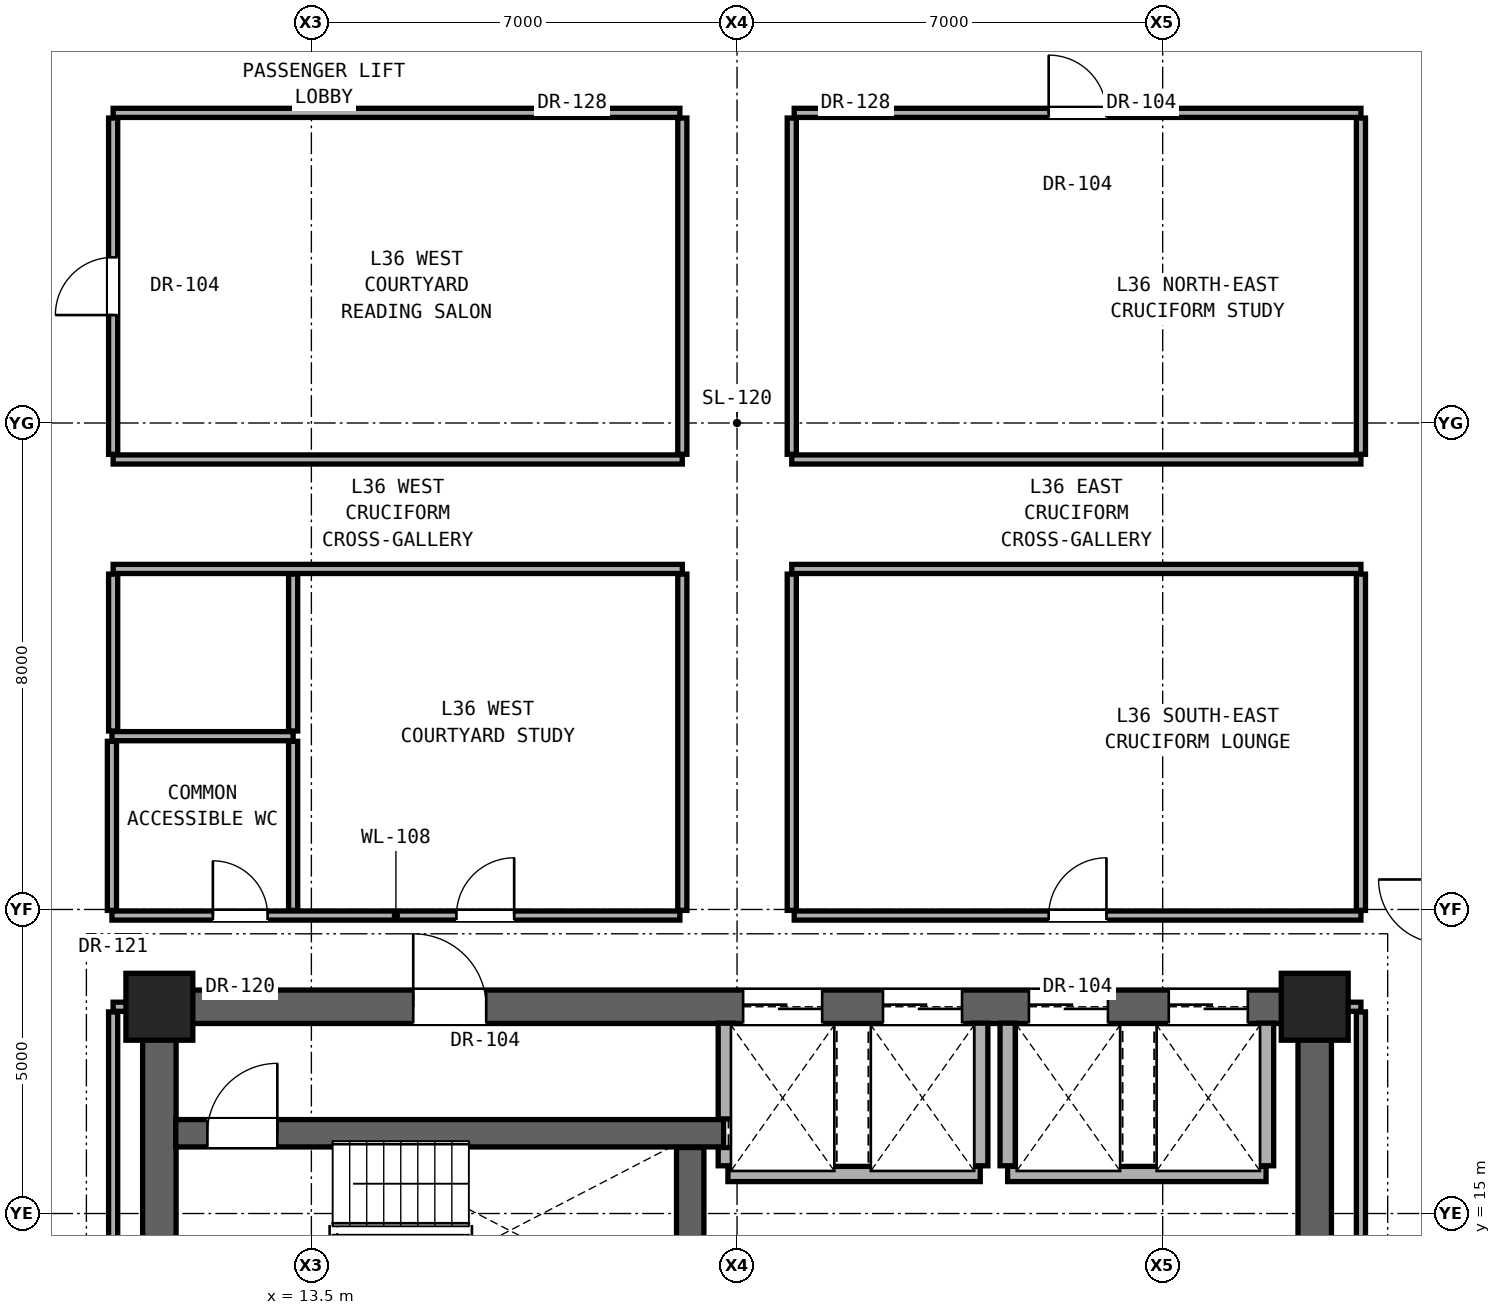
"""IFC4 building model, lengths in metres.
Left out: names, types, materials, properties, quantities, classifications, styles, units other than length and angle.
Written with IfcOpenShell. Run it as: python <this file> out.ifc"""

import sys

from ifc_helpers import new_model, si_unit, direction, frame, frame_2d, origin, origin_2d, place, context, subcontext, project, spatial, rectangle, extrude, element, fill, save


model = new_model("IFC4")
c1 = context("Model", 3, precision=1e-05, world=origin(), true_north=direction((0.0, 1.0)))
c2 = subcontext(c1, "Body", "Model", "MODEL_VIEW")
j1 = project(units=[si_unit("LENGTHUNIT", "METRE"), si_unit("PLANEANGLEUNIT", "RADIAN")], contexts=[c1])
p1 = place(None, origin())
s1 = spatial("IfcSite", under=j1, at=p1, CompositionType="ELEMENT")
p2 = place(p1, origin())
s2 = spatial("IfcBuilding", under=s1, at=p2, CompositionType="ELEMENT")
p3 = place(p2, frame((0.0, 0.0, 128.0)))
s3 = spatial("IfcBuildingStorey", under=s2, at=p3, CompositionType="ELEMENT", Elevation=128.0)
for number, where, z_axis, x_axis in (
    (1, (11.0, 18.4, 0.0), (0.0, 0.0, 1.0), (1.0, 0.0, 0.0)),
    (2, (30.0, 18.4, 0.0), (0.0, 0.0, 1.0), (1.0, 0.0, 0.0)),
):
    element("IfcColumn", number, at=place(p3, frame(where, z_axis=z_axis, x_axis=x_axis)), inside=s3, PredefinedType="COLUMN", context=c2, shape_type="SweptSolid", body=[
        extrude(rectangle(XDim=1.1, YDim=1.1, at=origin_2d()), origin(), (0.0, 0.0, 1.0), 3.3),
    ])
for number, where, z_axis, x_axis in (
    (3, (11.0, 12.4, 0.0), (0.0, 0.0, 1.0), (0.0, 1.0, 0.0)),
    (4, (30.0, 12.4, 0.0), (0.0, 0.0, 1.0), (0.0, 1.0, 0.0)),
):
    element("IfcWall", number, at=place(p3, frame(where, z_axis=z_axis, x_axis=x_axis)), inside=s3, PredefinedType="SHEAR", context=c2, shape_type="SweptSolid", body=[
        extrude(rectangle(XDim=6.0, YDim=0.55, at=frame_2d((3.0, 0.0))), origin(), (0.0, 0.0, 1.0), 3.08),
    ])
p4 = place(p3, frame((11.0, 18.4, 0.0), z_axis=(0.0, 0.0, 1.0), x_axis=(1.0, 0.0, 0.0)))
e5 = element("IfcWall", 5, at=p4, inside=s3, PredefinedType="SHEAR", context=c2, shape_type="SweptSolid", body=[
    extrude(rectangle(XDim=19.0, YDim=0.55, at=frame_2d((9.5, 0.0))), origin(), (0.0, 0.0, 1.0), 3.08),
])
p5 = place(p4, frame((4.175, 0.0, 0.0)))
e6 = element("IfcOpeningElement", 6, at=p5, cuts=e5, PredefinedType="OPENING", context=c2, shape_type="SweptSolid", body=[
    extrude(rectangle(XDim=1.2, YDim=2.25, at=frame_2d((0.6, 1.125))), frame((0.0, 0.285, 0.0), z_axis=(0.0, -1.0, 0.0), x_axis=(1.0, 0.0, 0.0)), (0.0, 0.0, 1.0), 0.57),
])
p6 = place(p4, frame((9.6, 0.0, 0.0)))
e7 = element("IfcOpeningElement", 7, at=p6, cuts=e5, PredefinedType="OPENING", context=c2, shape_type="SweptSolid", body=[
    extrude(rectangle(XDim=1.3, YDim=2.3, at=frame_2d((0.65, 1.15))), frame((0.0, 0.285, 0.0), z_axis=(0.0, -1.0, 0.0), x_axis=(1.0, 0.0, 0.0)), (0.0, 0.0, 1.0), 0.57),
])
p7 = place(p4, frame((11.9, 0.0, 0.0)))
e8 = element("IfcOpeningElement", 8, at=p7, cuts=e5, PredefinedType="OPENING", context=c2, shape_type="SweptSolid", body=[
    extrude(rectangle(XDim=1.3, YDim=2.3, at=frame_2d((0.65, 1.15))), frame((0.0, 0.285, 0.0), z_axis=(0.0, -1.0, 0.0), x_axis=(1.0, 0.0, 0.0)), (0.0, 0.0, 1.0), 0.57),
])
p8 = place(p4, frame((14.3, 0.0, 0.0)))
e9 = element("IfcOpeningElement", 9, at=p8, cuts=e5, PredefinedType="OPENING", context=c2, shape_type="SweptSolid", body=[
    extrude(rectangle(XDim=1.3, YDim=2.3, at=frame_2d((0.65, 1.15))), frame((0.0, 0.285, 0.0), z_axis=(0.0, -1.0, 0.0), x_axis=(1.0, 0.0, 0.0)), (0.0, 0.0, 1.0), 0.57),
])
p9 = place(p4, frame((16.6, 0.0, 0.0)))
e10 = element("IfcOpeningElement", 10, at=p9, cuts=e5, PredefinedType="OPENING", context=c2, shape_type="SweptSolid", body=[
    extrude(rectangle(XDim=1.3, YDim=2.3, at=frame_2d((0.65, 1.15))), frame((0.0, 0.285, 0.0), z_axis=(0.0, -1.0, 0.0), x_axis=(1.0, 0.0, 0.0)), (0.0, 0.0, 1.0), 0.57),
])
p10 = place(p3, frame((20.35, 15.65, 0.0), z_axis=(0.0, 0.0, 1.0), x_axis=(1.0, 0.0, 0.0)))
e11 = element("IfcWall", 11, at=p10, inside=s3, PredefinedType="SOLIDWALL", context=c2, shape_type="SweptSolid", body=[
    extrude(rectangle(XDim=4.15, YDim=0.25, at=frame_2d((2.075, 0.0))), origin(), (0.0, 0.0, 1.0), 3.08),
])
p11 = place(p3, frame((24.95, 15.65, 0.0), z_axis=(0.0, 0.0, 1.0), x_axis=(1.0, 0.0, 0.0)))
e12 = element("IfcWall", 12, at=p11, inside=s3, PredefinedType="SOLIDWALL", context=c2, shape_type="SweptSolid", body=[
    extrude(rectangle(XDim=4.25, YDim=0.25, at=frame_2d((2.125, 0.0))), origin(), (0.0, 0.0, 1.0), 3.08),
])
p12 = place(p3, frame((11.27, 16.32, 0.0), z_axis=(0.0, 0.0, 1.0), x_axis=(1.0, 0.0, 0.0)))
e13 = element("IfcWall", 13, at=p12, inside=s3, PredefinedType="SHEAR", context=c2, shape_type="SweptSolid", body=[
    extrude(rectangle(XDim=9.01, YDim=0.45, at=frame_2d((4.505, 0.0))), origin(), (0.0, 0.0, 1.0), 3.08),
])
p13 = place(p12, frame((0.52, 0.0, 0.0)))
e14 = element("IfcOpeningElement", 14, at=p13, cuts=e13, PredefinedType="OPENING", context=c2, shape_type="SweptSolid", body=[
    extrude(rectangle(XDim=1.15, YDim=2.2, at=frame_2d((0.575, 1.1))), frame((0.0, 0.235, 0.0), z_axis=(0.0, -1.0, 0.0), x_axis=(1.0, 0.0, 0.0)), (0.0, 0.0, 1.0), 0.47),
])
for number, where, z_axis, x_axis in (
    (15, (10.24, 18.4, 0.0), (0.0, 0.0, 1.0), (1.0, 0.0, 0.0)),
    (16, (30.27, 18.4, 0.0), (0.0, 0.0, 1.0), (1.0, 0.0, 0.0)),
):
    element("IfcWall", number, at=place(p3, frame(where, z_axis=z_axis, x_axis=x_axis)), inside=s3, PredefinedType="PARTITIONING", context=c2, shape_type="SweptSolid", body=[
        extrude(rectangle(XDim=0.49, YDim=0.15, at=frame_2d((0.245, 0.0))), origin(), (0.0, 0.0, 1.0), 2.456),
    ])
p14 = place(p3, frame((10.22, 19.9, 0.0), z_axis=(0.0, 0.0, 1.0), x_axis=(1.0, 0.0, 0.0)))
e17 = element("IfcWall", 17, at=p14, inside=s3, PredefinedType="PARTITIONING", context=c2, shape_type="SweptSolid", body=[
    extrude(rectangle(XDim=9.34, YDim=0.15, at=frame_2d((4.67, 0.0))), origin(), (0.0, 0.0, 1.0), 2.216),
])
p15 = place(p14, frame((1.66, 0.0, 0.0)))
e18 = element("IfcOpeningElement", 18, at=p15, cuts=e17, PredefinedType="OPENING", context=c2, shape_type="SweptSolid", body=[
    extrude(rectangle(XDim=0.9, YDim=2.1, at=frame_2d((0.45, 1.05))), frame((0.0, 0.085, 0.0), z_axis=(0.0, -1.0, 0.0), x_axis=(1.0, 0.0, 0.0)), (0.0, 0.0, 1.0), 0.17),
])
p16 = place(p14, frame((5.665, 0.0, 0.0)))
e19 = element("IfcOpeningElement", 19, at=p16, cuts=e17, PredefinedType="OPENING", context=c2, shape_type="SweptSolid", body=[
    extrude(rectangle(XDim=0.95, YDim=2.15, at=frame_2d((0.475, 1.075))), frame((0.0, 0.085, 0.0), z_axis=(0.0, -1.0, 0.0), x_axis=(1.0, 0.0, 0.0)), (0.0, 0.0, 1.0), 0.17),
])
p17 = place(p3, frame((21.44, 19.9, 0.0), z_axis=(0.0, 0.0, 1.0), x_axis=(1.0, 0.0, 0.0)))
e20 = element("IfcWall", 20, at=p17, inside=s3, PredefinedType="PARTITIONING", context=c2, shape_type="SweptSolid", body=[
    extrude(rectangle(XDim=9.32, YDim=0.15, at=frame_2d((4.66, 0.0))), origin(), (0.0, 0.0, 1.0), 2.216),
])
p18 = place(p17, frame((4.185, 0.0, 0.0)))
e21 = element("IfcOpeningElement", 21, at=p18, cuts=e20, PredefinedType="OPENING", context=c2, shape_type="SweptSolid", body=[
    extrude(rectangle(XDim=0.95, YDim=2.15, at=frame_2d((0.475, 1.075))), frame((0.0, 0.085, 0.0), z_axis=(0.0, -1.0, 0.0), x_axis=(1.0, 0.0, 0.0)), (0.0, 0.0, 1.0), 0.17),
])
p19 = place(p3, frame((10.22, 22.85, 0.0), z_axis=(0.0, 0.0, 1.0), x_axis=(1.0, 0.0, 0.0)))
e22 = element("IfcWall", 22, at=p19, inside=s3, PredefinedType="PARTITIONING", context=c2, shape_type="SweptSolid", body=[
    extrude(rectangle(XDim=2.98, YDim=0.15, at=frame_2d((1.49, 0.0))), origin(), (0.0, 0.0, 1.0), 2.216),
])
for number, where, z_axis, x_axis in (
    (23, (10.24, 25.6, 0.0), (0.0, 0.0, 1.0), (1.0, 0.0, 0.0)),
    (24, (21.4, 25.6, 0.0), (0.0, 0.0, 1.0), (1.0, 0.0, 0.0)),
    (25, (10.24, 27.4, 0.0), (0.0, 0.0, 1.0), (1.0, 0.0, 0.0)),
    (26, (21.4, 27.4, 0.0), (0.0, 0.0, 1.0), (1.0, 0.0, 0.0)),
):
    element("IfcWall", number, at=place(p3, frame(where, z_axis=z_axis, x_axis=x_axis)), inside=s3, PredefinedType="PARTITIONING", context=c2, shape_type="SweptSolid", body=[
        extrude(rectangle(XDim=9.36, YDim=0.15, at=frame_2d((4.68, 0.0))), origin(), (0.0, 0.0, 1.0), 2.216),
    ])
p20 = place(p3, frame((10.24, 33.1, 0.0), z_axis=(0.0, 0.0, 1.0), x_axis=(1.0, 0.0, 0.0)))
e27 = element("IfcWall", 27, at=p20, inside=s3, PredefinedType="PARTITIONING", context=c2, shape_type="SweptSolid", body=[
    extrude(rectangle(XDim=9.32, YDim=0.15, at=frame_2d((4.66, 0.0))), origin(), (0.0, 0.0, 1.0), 2.216),
])
p21 = place(p3, frame((21.44, 33.1, 0.0), z_axis=(0.0, 0.0, 1.0), x_axis=(1.0, 0.0, 0.0)))
e28 = element("IfcWall", 28, at=p21, inside=s3, PredefinedType="PARTITIONING", context=c2, shape_type="SweptSolid", body=[
    extrude(rectangle(XDim=9.32, YDim=0.15, at=frame_2d((4.66, 0.0))), origin(), (0.0, 0.0, 1.0), 2.216),
])
p22 = place(p21, frame((4.185, 0.0, 0.0)))
e29 = element("IfcOpeningElement", 29, at=p22, cuts=e28, PredefinedType="OPENING", context=c2, shape_type="SweptSolid", body=[
    extrude(rectangle(XDim=0.95, YDim=2.15, at=frame_2d((0.475, 1.075))), frame((0.0, 0.085, 0.0), z_axis=(0.0, -1.0, 0.0), x_axis=(1.0, 0.0, 0.0)), (0.0, 0.0, 1.0), 0.17),
])
p23 = place(p3, frame((10.22, 19.985, 0.0), z_axis=(0.0, 0.0, 1.0), x_axis=(0.0, 1.0, 0.0)))
e30 = element("IfcWall", 30, at=p23, inside=s3, PredefinedType="PARTITIONING", context=c2, shape_type="SweptSolid", body=[
    extrude(rectangle(XDim=2.78, YDim=0.15, at=frame_2d((1.39, 0.0))), origin(), (0.0, 0.0, 1.0), 3.08),
])
p24 = place(p3, frame((10.24, 12.335, 0.0), z_axis=(0.0, 0.0, 1.0), x_axis=(0.0, 1.0, 0.0)))
e31 = element("IfcWall", 31, at=p24, inside=s3, PredefinedType="PARTITIONING", context=c2, shape_type="SweptSolid", body=[
    extrude(rectangle(XDim=5.98, YDim=0.15, at=frame_2d((2.99, 0.0))), origin(), (0.0, 0.0, 1.0), 2.456),
])
p25 = place(p3, frame((10.24, 22.935, 0.0), z_axis=(0.0, 0.0, 1.0), x_axis=(0.0, 1.0, 0.0)))
e32 = element("IfcWall", 32, at=p25, inside=s3, PredefinedType="PARTITIONING", context=c2, shape_type="SweptSolid", body=[
    extrude(rectangle(XDim=2.58, YDim=0.15, at=frame_2d((1.29, 0.0))), origin(), (0.0, 0.0, 1.0), 2.299),
])
p26 = place(p3, frame((10.24, 27.485, 0.0), z_axis=(0.0, 0.0, 1.0), x_axis=(0.0, 1.0, 0.0)))
e33 = element("IfcWall", 33, at=p26, inside=s3, PredefinedType="PARTITIONING", context=c2, shape_type="SweptSolid", body=[
    extrude(rectangle(XDim=5.53, YDim=0.15, at=frame_2d((2.765, 0.0))), origin(), (0.0, 0.0, 1.0), 2.299),
])
p27 = place(p26, frame((2.29, 0.0, 0.0)))
e34 = element("IfcOpeningElement", 34, at=p27, cuts=e33, PredefinedType="OPENING", context=c2, shape_type="SweptSolid", body=[
    extrude(rectangle(XDim=0.95, YDim=2.15, at=frame_2d((0.475, 1.075))), frame((0.0, 0.085, 0.0), z_axis=(0.0, -1.0, 0.0), x_axis=(1.0, 0.0, 0.0)), (0.0, 0.0, 1.0), 0.17),
])
p28 = place(p3, frame((13.2, 19.985, 0.0), z_axis=(0.0, 0.0, 1.0), x_axis=(0.0, 1.0, 0.0)))
e35 = element("IfcWall", 35, at=p28, inside=s3, PredefinedType="PARTITIONING", context=c2, shape_type="SweptSolid", body=[
    extrude(rectangle(XDim=2.78, YDim=0.15, at=frame_2d((1.39, 0.0))), origin(), (0.0, 0.0, 1.0), 3.08),
])
p29 = place(p3, frame((13.2, 22.935, 0.0), z_axis=(0.0, 0.0, 1.0), x_axis=(0.0, 1.0, 0.0)))
e36 = element("IfcWall", 36, at=p29, inside=s3, PredefinedType="PARTITIONING", context=c2, shape_type="SweptSolid", body=[
    extrude(rectangle(XDim=2.58, YDim=0.15, at=frame_2d((1.29, 0.0))), origin(), (0.0, 0.0, 1.0), 2.216),
])
for number, where, z_axis, x_axis in (
    (37, (19.6, 19.985, 0.0), (0.0, 0.0, 1.0), (0.0, 1.0, 0.0)),
    (38, (19.6, 27.485, 0.0), (0.0, 0.0, 1.0), (0.0, 1.0, 0.0)),
):
    element("IfcWall", number, at=place(p3, frame(where, z_axis=z_axis, x_axis=x_axis)), inside=s3, PredefinedType="PARTITIONING", context=c2, shape_type="SweptSolid", body=[
        extrude(rectangle(XDim=5.53, YDim=0.15, at=frame_2d((2.765, 0.0))), origin(), (0.0, 0.0, 1.0), 2.216),
    ])
p30 = place(p3, frame((19.73, 13.355, 0.0), z_axis=(0.0, 0.0, 1.0), x_axis=(0.0, 1.0, 0.0)))
e39 = element("IfcWall", 39, at=p30, inside=s3, PredefinedType="SHEAR", context=c2, shape_type="SweptSolid", body=[
    extrude(rectangle(XDim=2.73, YDim=0.45, at=frame_2d((1.365, 0.0))), origin(), (0.0, 0.0, 1.0), 3.08),
])
p31 = place(p3, frame((20.315, 15.785, 0.0), z_axis=(0.0, 0.0, 1.0), x_axis=(0.0, 1.0, 0.0)))
e40 = element("IfcWall", 40, at=p31, inside=s3, PredefinedType="SOLIDWALL", context=c2, shape_type="SweptSolid", body=[
    extrude(rectangle(XDim=0.3, YDim=0.25, at=frame_2d((0.15, 0.0))), origin(), (0.0, 0.0, 1.0), 3.08),
])
p32 = place(p3, frame((20.315, 16.555, 0.0), z_axis=(0.0, 0.0, 1.0), x_axis=(0.0, 1.0, 0.0)))
e41 = element("IfcWall", 41, at=p32, inside=s3, PredefinedType="SOLIDWALL", context=c2, shape_type="SweptSolid", body=[
    extrude(rectangle(XDim=1.575, YDim=0.25, at=frame_2d((0.788, 0.0))), origin(), (0.0, 0.0, 1.0), 3.08),
])
for number, where, z_axis, x_axis in (
    (42, (21.4, 19.985, 0.0), (0.0, 0.0, 1.0), (0.0, 1.0, 0.0)),
    (43, (21.4, 27.485, 0.0), (0.0, 0.0, 1.0), (0.0, 1.0, 0.0)),
):
    element("IfcWall", number, at=place(p3, frame(where, z_axis=z_axis, x_axis=x_axis)), inside=s3, PredefinedType="PARTITIONING", context=c2, shape_type="SweptSolid", body=[
        extrude(rectangle(XDim=5.53, YDim=0.15, at=frame_2d((2.765, 0.0))), origin(), (0.0, 0.0, 1.0), 2.216),
    ])
for number, where, z_axis, x_axis in (
    (44, (24.5, 15.785, 0.0), (0.0, 0.0, 1.0), (0.0, 1.0, 0.0)),
    (45, (24.95, 15.785, 0.0), (0.0, 0.0, 1.0), (0.0, 1.0, 0.0)),
    (46, (29.2, 15.785, 0.0), (0.0, 0.0, 1.0), (0.0, 1.0, 0.0)),
):
    element("IfcWall", number, at=place(p3, frame(where, z_axis=z_axis, x_axis=x_axis)), inside=s3, PredefinedType="SOLIDWALL", context=c2, shape_type="SweptSolid", body=[
        extrude(rectangle(XDim=2.345, YDim=0.25, at=frame_2d((1.172, 0.0))), origin(), (0.0, 0.0, 1.0), 3.08),
    ])
p33 = place(p3, frame((30.76, 12.335, 0.0), z_axis=(0.0, 0.0, 1.0), x_axis=(0.0, 1.0, 0.0)))
e47 = element("IfcWall", 47, at=p33, inside=s3, PredefinedType="PARTITIONING", context=c2, shape_type="SweptSolid", body=[
    extrude(rectangle(XDim=5.98, YDim=0.15, at=frame_2d((2.99, 0.0))), origin(), (0.0, 0.0, 1.0), 2.456),
])
for number, where, z_axis, x_axis in (
    (48, (30.76, 19.985, 0.0), (0.0, 0.0, 1.0), (0.0, 1.0, 0.0)),
    (49, (30.76, 27.485, 0.0), (0.0, 0.0, 1.0), (0.0, 1.0, 0.0)),
):
    element("IfcWall", number, at=place(p3, frame(where, z_axis=z_axis, x_axis=x_axis)), inside=s3, PredefinedType="PARTITIONING", context=c2, shape_type="SweptSolid", body=[
        extrude(rectangle(XDim=5.53, YDim=0.15, at=frame_2d((2.765, 0.0))), origin(), (0.0, 0.0, 1.0), 2.299),
    ])
p34 = place(p5, origin())
e50 = element("IfcDoor", 50, at=p34, inside=s3, OperationType="SINGLE_SWING_LEFT", PredefinedType="DOOR", context=c2, shape_type="SweptSolid", body=[
    extrude(rectangle(XDim=1.2, YDim=2.25, at=frame_2d((0.6, 1.125))), frame((0.0, 0.025, 0.0), z_axis=(0.0, -1.0, 0.0), x_axis=(1.0, 0.0, 0.0)), (0.0, 0.0, 1.0), 0.05),
])
fill(e6, e50)
p35 = place(p13, origin())
e51 = element("IfcDoor", 51, at=p35, inside=s3, OperationType="SINGLE_SWING_RIGHT", PredefinedType="DOOR", context=c2, shape_type="SweptSolid", body=[
    extrude(rectangle(XDim=1.15, YDim=2.2, at=frame_2d((0.575, 1.1))), frame((0.0, 0.025, 0.0), z_axis=(0.0, -1.0, 0.0), x_axis=(1.0, 0.0, 0.0)), (0.0, 0.0, 1.0), 0.05),
])
fill(e14, e51)
p36 = place(p15, origin())
e52 = element("IfcDoor", 52, at=p36, inside=s3, OperationType="SINGLE_SWING_LEFT", PredefinedType="DOOR", context=c2, shape_type="SweptSolid", body=[
    extrude(rectangle(XDim=0.9, YDim=2.1, at=frame_2d((0.45, 1.05))), frame((0.0, 0.025, 0.0), z_axis=(0.0, -1.0, 0.0), x_axis=(1.0, 0.0, 0.0)), (0.0, 0.0, 1.0), 0.05),
])
fill(e18, e52)
p37 = place(p16, origin())
e53 = element("IfcDoor", 53, at=p37, inside=s3, OperationType="SINGLE_SWING_RIGHT", PredefinedType="DOOR", context=c2, shape_type="SweptSolid", body=[
    extrude(rectangle(XDim=0.95, YDim=2.15, at=frame_2d((0.475, 1.075))), frame((0.0, 0.025, 0.0), z_axis=(0.0, -1.0, 0.0), x_axis=(1.0, 0.0, 0.0)), (0.0, 0.0, 1.0), 0.05),
])
fill(e19, e53)
p38 = place(p27, origin())
e54 = element("IfcDoor", 54, at=p38, inside=s3, OperationType="SINGLE_SWING_LEFT", PredefinedType="DOOR", context=c2, shape_type="SweptSolid", body=[
    extrude(rectangle(XDim=0.95, YDim=2.15, at=frame_2d((0.475, 1.075))), frame((0.0, 0.025, 0.0), z_axis=(0.0, -1.0, 0.0), x_axis=(1.0, 0.0, 0.0)), (0.0, 0.0, 1.0), 0.05),
])
fill(e34, e54)
p39 = place(p18, origin())
e55 = element("IfcDoor", 55, at=p39, inside=s3, OperationType="SINGLE_SWING_RIGHT", PredefinedType="DOOR", context=c2, shape_type="SweptSolid", body=[
    extrude(rectangle(XDim=0.95, YDim=2.15, at=frame_2d((0.475, 1.075))), frame((0.0, 0.025, 0.0), z_axis=(0.0, -1.0, 0.0), x_axis=(1.0, 0.0, 0.0)), (0.0, 0.0, 1.0), 0.05),
])
fill(e21, e55)
p40 = place(p22, origin())
e56 = element("IfcDoor", 56, at=p40, inside=s3, OperationType="SINGLE_SWING_LEFT", PredefinedType="DOOR", context=c2, shape_type="SweptSolid", body=[
    extrude(rectangle(XDim=0.95, YDim=2.15, at=frame_2d((0.475, 1.075))), frame((0.0, 0.025, 0.0), z_axis=(0.0, -1.0, 0.0), x_axis=(1.0, 0.0, 0.0)), (0.0, 0.0, 1.0), 0.05),
])
fill(e29, e56)
p41 = place(p6, origin())
e57 = element("IfcDoor", 57, at=p41, inside=s3, OperationType="DOUBLE_DOOR_SLIDING", PredefinedType="DOOR", context=c2, shape_type="SweptSolid", body=[
    extrude(rectangle(XDim=1.3, YDim=2.3, at=frame_2d((0.65, 1.15))), frame((0.0, 0.025, 0.0), z_axis=(0.0, -1.0, 0.0), x_axis=(1.0, 0.0, 0.0)), (0.0, 0.0, 1.0), 0.05),
])
fill(e7, e57)
p42 = place(p7, origin())
e58 = element("IfcDoor", 58, at=p42, inside=s3, OperationType="DOUBLE_DOOR_SLIDING", PredefinedType="DOOR", context=c2, shape_type="SweptSolid", body=[
    extrude(rectangle(XDim=1.3, YDim=2.3, at=frame_2d((0.65, 1.15))), frame((0.0, 0.025, 0.0), z_axis=(0.0, -1.0, 0.0), x_axis=(1.0, 0.0, 0.0)), (0.0, 0.0, 1.0), 0.05),
])
fill(e8, e58)
p43 = place(p8, origin())
e59 = element("IfcDoor", 59, at=p43, inside=s3, OperationType="DOUBLE_DOOR_SLIDING", PredefinedType="DOOR", context=c2, shape_type="SweptSolid", body=[
    extrude(rectangle(XDim=1.3, YDim=2.3, at=frame_2d((0.65, 1.15))), frame((0.0, 0.025, 0.0), z_axis=(0.0, -1.0, 0.0), x_axis=(1.0, 0.0, 0.0)), (0.0, 0.0, 1.0), 0.05),
])
fill(e9, e59)
p44 = place(p9, origin())
e60 = element("IfcDoor", 60, at=p44, inside=s3, OperationType="DOUBLE_DOOR_SLIDING", PredefinedType="DOOR", context=c2, shape_type="SweptSolid", body=[
    extrude(rectangle(XDim=1.3, YDim=2.3, at=frame_2d((0.65, 1.15))), frame((0.0, 0.025, 0.0), z_axis=(0.0, -1.0, 0.0), x_axis=(1.0, 0.0, 0.0)), (0.0, 0.0, 1.0), 0.05),
])
fill(e10, e60)
save(model, sys.argv[1])
